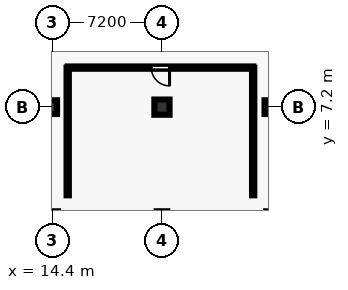
"""IFC4 building model, lengths in metres.
Left out: names, types, materials, properties, quantities, classifications, styles, units other than length and angle.
Written with IfcOpenShell. Run it as: python <this file> out.ifc"""

import sys

from ifc_helpers import new_model, si_unit, direction, frame, frame_2d, origin, origin_2d, place, context, subcontext, project, spatial, rectangle, circle, extrude, element, fill, save


model = new_model("IFC4")
c1 = context("Model", 3, precision=1e-05, world=origin(), true_north=direction((0.0, 1.0)))
c2 = subcontext(c1, "Body", "Model", "MODEL_VIEW")
j1 = project(units=[si_unit("LENGTHUNIT", "METRE"), si_unit("PLANEANGLEUNIT", "RADIAN")], contexts=[c1])
p1 = place(None, origin())
s1 = spatial("IfcSite", under=j1, at=p1, CompositionType="ELEMENT")
p2 = place(p1, origin())
s2 = spatial("IfcBuilding", under=s1, at=p2, CompositionType="ELEMENT")
p3 = place(p2, origin())
s3 = spatial("IfcBuildingStorey", under=s2, at=p3, CompositionType="ELEMENT", Elevation=0.0)
p4 = place(p3, frame((14.4, 7.2, 0.0), z_axis=(0.0, 0.0, 1.0), x_axis=(1.0, 0.0, 0.0)))
e1 = element("IfcColumn", 1, at=p4, inside=s3, PredefinedType="COLUMN", context=c2, shape_type="SweptSolid", body=[
    extrude(rectangle(XDim=0.6, YDim=0.9, at=origin_2d()), origin(), (0.0, 0.0, 1.0), 5.4),
])
p5 = place(p3, frame((21.6, 7.2, 0.0), z_axis=(0.0, 0.0, 1.0), x_axis=(1.0, 0.0, 0.0)))
e2 = element("IfcColumn", 2, at=p5, inside=s3, PredefinedType="COLUMN", context=c2, shape_type="SweptSolid", body=[
    extrude(circle(Radius=0.5, at=origin_2d()), origin(), (0.0, 0.0, 1.0), 5.4),
])
p6 = place(p3, frame((28.8, 7.2, 0.0), z_axis=(0.0, 0.0, 1.0), x_axis=(1.0, 0.0, 0.0)))
e3 = element("IfcColumn", 3, at=p6, inside=s3, PredefinedType="COLUMN", context=c2, shape_type="SweptSolid", body=[
    extrude(rectangle(XDim=0.9, YDim=0.9, at=origin_2d()), origin(), (0.0, 0.0, 1.0), 5.4),
])
p7 = place(p3, frame((27.6, 1.4, 0.0), z_axis=(0.0, 0.0, 1.0), x_axis=(0.0, 1.0, 0.0)))
e4 = element("IfcWall", 4, at=p7, inside=s3, PredefinedType="PARTITIONING", context=c2, shape_type="SweptSolid", body=[
    extrude(rectangle(XDim=8.4, YDim=0.15, at=frame_2d((4.2, 0.0))), origin(), (0.0, 0.0, 1.0), 4.1),
])
p8 = place(p3, frame((27.6, 9.8, 0.0), z_axis=(0.0, 0.0, 1.0), x_axis=(-1.0, 0.0, 0.0)))
e5 = element("IfcWall", 5, at=p8, inside=s3, PredefinedType="PARTITIONING", context=c2, shape_type="SweptSolid", body=[
    extrude(rectangle(XDim=12.2, YDim=0.15, at=frame_2d((6.1, 0.0))), origin(), (0.0, 0.0, 1.0), 4.1),
])
p9 = place(p8, frame((5.5, 0.0, 0.0)))
e6 = element("IfcOpeningElement", 6, at=p9, cuts=e5, PredefinedType="OPENING", context=c2, shape_type="SweptSolid", body=[
    extrude(rectangle(XDim=1.2, YDim=2.2, at=frame_2d((0.6, 1.1))), frame((0.0, 0.085, 0.0), z_axis=(0.0, -1.0, 0.0), x_axis=(1.0, 0.0, 0.0)), (0.0, 0.0, 1.0), 0.17),
])
p10 = place(p3, frame((15.4, 9.8, 0.0), z_axis=(0.0, 0.0, 1.0), x_axis=(0.0, -1.0, 0.0)))
e7 = element("IfcWall", 7, at=p10, inside=s3, PredefinedType="PARTITIONING", context=c2, shape_type="SweptSolid", body=[
    extrude(rectangle(XDim=8.4, YDim=0.15, at=frame_2d((4.2, 0.0))), origin(), (0.0, 0.0, 1.0), 4.1),
])
p11 = place(p9, origin())
e8 = element("IfcDoor", 8, at=p11, inside=s3, OperationType="SINGLE_SWING_LEFT", PredefinedType="DOOR", context=c2, shape_type="SweptSolid", body=[
    extrude(rectangle(XDim=1.2, YDim=2.2, at=frame_2d((0.6, 1.1))), frame((0.0, 0.025, 0.0), z_axis=(0.0, -1.0, 0.0), x_axis=(1.0, 0.0, 0.0)), (0.0, 0.0, 1.0), 0.05),
])
fill(e6, e8)
save(model, sys.argv[1])
